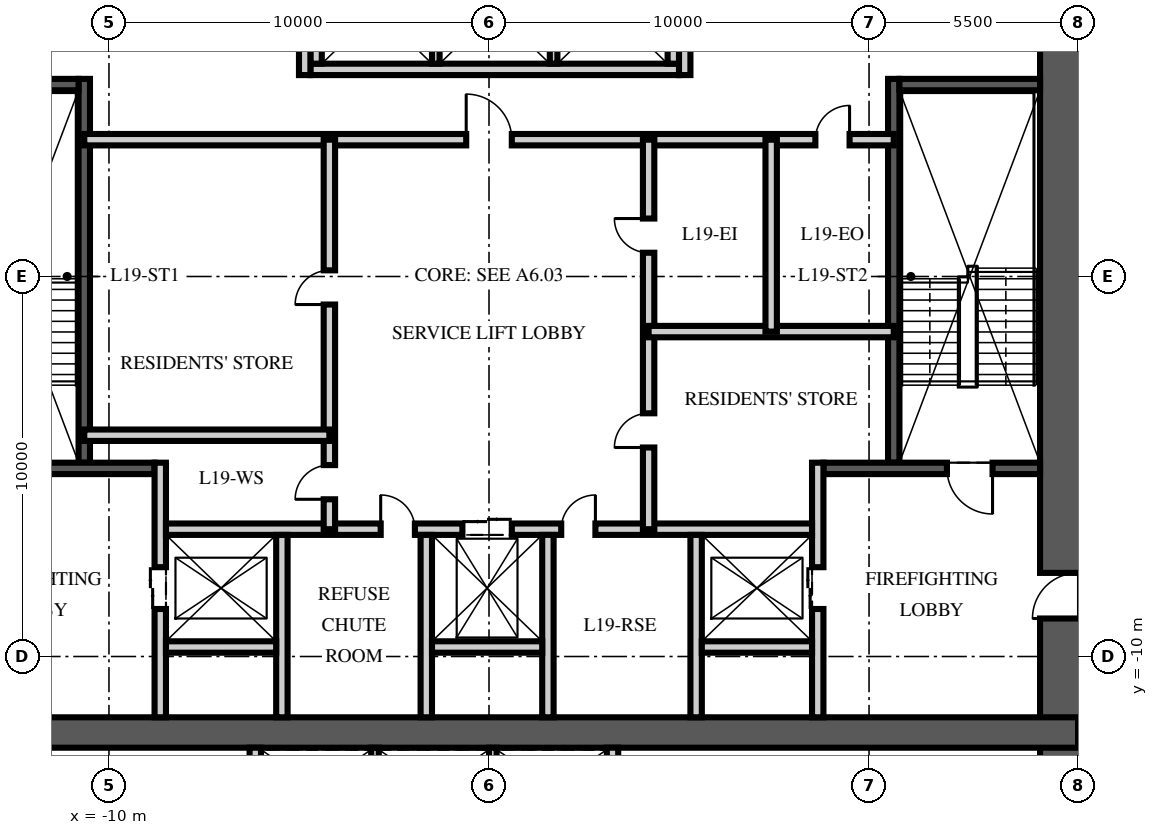
"""IFC4 building model, lengths in metres.
Left out: names, types, materials, properties, quantities, classifications, styles, units other than length and angle.
Written with IfcOpenShell. Run it as: python <this file> out.ifc"""

import sys

from ifc_helpers import new_model, si_unit, direction, frame, frame_2d, origin, place, context, subcontext, project, spatial, rectangle, extrude, element, fill, save


model = new_model("IFC4")
c1 = context("Model", 3, precision=1e-05, world=origin(), true_north=direction((0.0, 1.0)))
c2 = subcontext(c1, "Body", "Model", "MODEL_VIEW")
j1 = project(units=[si_unit("LENGTHUNIT", "METRE"), si_unit("PLANEANGLEUNIT", "RADIAN")], contexts=[c1])
p1 = place(None, origin())
s1 = spatial("IfcSite", under=j1, at=p1, CompositionType="ELEMENT")
p2 = place(p1, origin())
s2 = spatial("IfcBuilding", under=s1, at=p2, CompositionType="ELEMENT")
p3 = place(p2, frame((0.0, 0.0, 77.25)))
s3 = spatial("IfcBuildingStorey", under=s2, at=p3, CompositionType="ELEMENT", Elevation=77.25)
p4 = place(p3, frame((15.5, -15.5, -0.25), z_axis=(0.0, 0.0, 1.0), x_axis=(0.0, 1.0, 0.0)))
e1 = element("IfcWall", 1, at=p4, inside=s3, PredefinedType="SHEAR", context=c2, shape_type="SweptSolid", body=[
    extrude(rectangle(XDim=31.0, YDim=2.0, at=frame_2d((15.5, 0.0))), origin(), (0.0, 0.0, 1.0), 3.75),
])
p5 = place(p4, frame((6.5, 0.0, 0.25)))
e2 = element("IfcOpeningElement", 2, at=p5, cuts=e1, PredefinedType="OPENING", context=c2, shape_type="SweptSolid", body=[
    extrude(rectangle(XDim=1.2, YDim=2.1, at=frame_2d((0.6, 1.05))), frame((0.0, 1.01, 0.0), z_axis=(0.0, -1.0, 0.0), x_axis=(1.0, 0.0, 0.0)), (0.0, 0.0, 1.0), 2.02),
])
p6 = place(p4, frame((23.0, 0.0, 0.25)))
e3 = element("IfcOpeningElement", 3, at=p6, cuts=e1, PredefinedType="OPENING", context=c2, shape_type="SweptSolid", body=[
    extrude(rectangle(XDim=1.8, YDim=2.1, at=frame_2d((0.9, 1.05))), frame((0.0, 1.01, 0.0), z_axis=(0.0, -1.0, 0.0), x_axis=(1.0, 0.0, 0.0)), (0.0, 0.0, 1.0), 2.02),
])
p7 = place(p3, frame((-15.5, -12.0, -0.25), z_axis=(0.0, 0.0, 1.0), x_axis=(1.0, 0.0, 0.0)))
e4 = element("IfcWall", 4, at=p7, inside=s3, PredefinedType="SHEAR", context=c2, shape_type="SweptSolid", body=[
    extrude(rectangle(XDim=31.0, YDim=0.8, at=frame_2d((15.5, 0.0))), origin(), (0.0, 0.0, 1.0), 3.75),
])
p8 = place(p3, frame((-10.65, -4.9, 0.0), z_axis=(0.0, 0.0, 1.0), x_axis=(0.0, 1.0, 0.0)))
e5 = element("IfcWall", 5, at=p8, inside=s3, PredefinedType="SOLIDWALL", context=c2, shape_type="SweptSolid", body=[
    extrude(rectangle(XDim=10.1, YDim=0.3, at=frame_2d((5.05, 0.0))), origin(), (0.0, 0.0, 1.0), 3.5),
])
p9 = place(p3, frame((-14.5, -5.05, 0.0), z_axis=(0.0, 0.0, 1.0), x_axis=(1.0, 0.0, 0.0)))
e6 = element("IfcWall", 6, at=p9, inside=s3, PredefinedType="SOLIDWALL", context=c2, shape_type="SweptSolid", body=[
    extrude(rectangle(XDim=5.7, YDim=0.3, at=frame_2d((2.85, 0.0))), origin(), (0.0, 0.0, 1.0), 3.5),
])
p10 = place(p9, frame((1.25, 0.0, 0.0)))
e7 = element("IfcOpeningElement", 7, at=p10, cuts=e6, PredefinedType="OPENING", context=c2, shape_type="SweptSolid", body=[
    extrude(rectangle(XDim=1.2, YDim=2.1, at=frame_2d((0.6, 1.05))), frame((0.0, 0.16, 0.0), z_axis=(0.0, -1.0, 0.0), x_axis=(1.0, 0.0, 0.0)), (0.0, 0.0, 1.0), 0.32),
])
p11 = place(p3, frame((-14.5, 5.05, 0.0), z_axis=(0.0, 0.0, 1.0), x_axis=(1.0, 0.0, 0.0)))
e8 = element("IfcWall", 8, at=p11, inside=s3, PredefinedType="SOLIDWALL", context=c2, shape_type="SweptSolid", body=[
    extrude(rectangle(XDim=3.7, YDim=0.3, at=frame_2d((1.85, 0.0))), origin(), (0.0, 0.0, 1.0), 3.5),
])
p12 = place(p3, frame((-8.65, -11.6, 0.0), z_axis=(0.0, 0.0, 1.0), x_axis=(0.0, 1.0, 0.0)))
e9 = element("IfcWall", 9, at=p12, inside=s3, PredefinedType="PARTITIONING", context=c2, shape_type="SweptSolid", body=[
    extrude(rectangle(XDim=6.7, YDim=0.3, at=frame_2d((3.35, 0.0))), origin(), (0.0, 0.0, 1.0), 3.5),
])
p13 = place(p12, frame((2.85, 0.0, 0.0)))
e10 = element("IfcOpeningElement", 10, at=p13, cuts=e9, PredefinedType="OPENING", context=c2, shape_type="SweptSolid", body=[
    extrude(rectangle(XDim=1.1, YDim=2.1, at=frame_2d((0.55, 1.05))), frame((0.0, 0.16, 0.0), z_axis=(0.0, -1.0, 0.0), x_axis=(1.0, 0.0, 0.0)), (0.0, 0.0, 1.0), 0.32),
])
p14 = place(p3, frame((10.65, -4.9, 0.0), z_axis=(0.0, 0.0, 1.0), x_axis=(0.0, 1.0, 0.0)))
e11 = element("IfcWall", 11, at=p14, inside=s3, PredefinedType="SOLIDWALL", context=c2, shape_type="SweptSolid", body=[
    extrude(rectangle(XDim=10.1, YDim=0.3, at=frame_2d((5.05, 0.0))), origin(), (0.0, 0.0, 1.0), 3.5),
])
p15 = place(p3, frame((14.5, -5.05, 0.0), z_axis=(0.0, 0.0, 1.0), x_axis=(-1.0, 0.0, 0.0)))
e12 = element("IfcWall", 12, at=p15, inside=s3, PredefinedType="SOLIDWALL", context=c2, shape_type="SweptSolid", body=[
    extrude(rectangle(XDim=5.7, YDim=0.3, at=frame_2d((2.85, 0.0))), origin(), (0.0, 0.0, 1.0), 3.5),
])
p16 = place(p15, frame((1.25, 0.0, 0.0)))
e13 = element("IfcOpeningElement", 13, at=p16, cuts=e12, PredefinedType="OPENING", context=c2, shape_type="SweptSolid", body=[
    extrude(rectangle(XDim=1.2, YDim=2.1, at=frame_2d((0.6, 1.05))), frame((0.0, 0.16, 0.0), z_axis=(0.0, -1.0, 0.0), x_axis=(1.0, 0.0, 0.0)), (0.0, 0.0, 1.0), 0.32),
])
p17 = place(p3, frame((14.5, 5.05, 0.0), z_axis=(0.0, 0.0, 1.0), x_axis=(-1.0, 0.0, 0.0)))
e14 = element("IfcWall", 14, at=p17, inside=s3, PredefinedType="SOLIDWALL", context=c2, shape_type="SweptSolid", body=[
    extrude(rectangle(XDim=3.7, YDim=0.3, at=frame_2d((1.85, 0.0))), origin(), (0.0, 0.0, 1.0), 3.5),
])
p18 = place(p3, frame((8.65, -11.6, 0.0), z_axis=(0.0, 0.0, 1.0), x_axis=(0.0, 1.0, 0.0)))
e15 = element("IfcWall", 15, at=p18, inside=s3, PredefinedType="PARTITIONING", context=c2, shape_type="SweptSolid", body=[
    extrude(rectangle(XDim=6.7, YDim=0.3, at=frame_2d((3.35, 0.0))), origin(), (0.0, 0.0, 1.0), 3.5),
])
p19 = place(p18, frame((2.85, 0.0, 0.0)))
e16 = element("IfcOpeningElement", 16, at=p19, cuts=e15, PredefinedType="OPENING", context=c2, shape_type="SweptSolid", body=[
    extrude(rectangle(XDim=1.1, YDim=2.1, at=frame_2d((0.55, 1.05))), frame((0.0, 0.16, 0.0), z_axis=(0.0, -1.0, 0.0), x_axis=(1.0, 0.0, 0.0)), (0.0, 0.0, 1.0), 0.32),
])
p20 = place(p3, frame((-8.5, -6.65, 0.0), z_axis=(0.0, 0.0, 1.0), x_axis=(1.0, 0.0, 0.0)))
e17 = element("IfcWall", 17, at=p20, inside=s3, PredefinedType="PARTITIONING", context=c2, shape_type="SweptSolid", body=[
    extrude(rectangle(XDim=17.0, YDim=0.3, at=frame_2d((8.5, 0.0))), origin(), (0.0, 0.0, 1.0), 3.5),
])
p21 = place(p20, frame((7.8, 0.0, 0.0)))
e18 = element("IfcOpeningElement", 18, at=p21, cuts=e17, PredefinedType="OPENING", context=c2, shape_type="SweptSolid", body=[
    extrude(rectangle(XDim=1.3, YDim=2.4, at=frame_2d((0.65, 1.2))), frame((0.0, 0.16, 0.0), z_axis=(0.0, -1.0, 0.0), x_axis=(1.0, 0.0, 0.0)), (0.0, 0.0, 1.0), 0.32),
])
p22 = place(p20, frame((5.65, 0.0, 0.0)))
e19 = element("IfcOpeningElement", 19, at=p22, cuts=e17, PredefinedType="OPENING", context=c2, shape_type="SweptSolid", body=[
    extrude(rectangle(XDim=0.9, YDim=2.1, at=frame_2d((0.45, 1.05))), frame((0.0, 0.16, 0.0), z_axis=(0.0, -1.0, 0.0), x_axis=(1.0, 0.0, 0.0)), (0.0, 0.0, 1.0), 0.32),
])
p23 = place(p20, frame((10.4, 0.0, 0.0)))
e20 = element("IfcOpeningElement", 20, at=p23, cuts=e17, PredefinedType="OPENING", context=c2, shape_type="SweptSolid", body=[
    extrude(rectangle(XDim=0.9, YDim=2.1, at=frame_2d((0.45, 1.05))), frame((0.0, 0.16, 0.0), z_axis=(0.0, -1.0, 0.0), x_axis=(1.0, 0.0, 0.0)), (0.0, 0.0, 1.0), 0.32),
])
for number, where, z_axis, x_axis in (
    (21, (-5.45, -11.6, 0.0), (0.0, 0.0, 1.0), (0.0, 1.0, 0.0)),
    (22, (-1.65, -11.6, 0.0), (0.0, 0.0, 1.0), (0.0, 1.0, 0.0)),
    (23, (1.55, -11.6, 0.0), (0.0, 0.0, 1.0), (0.0, 1.0, 0.0)),
    (24, (5.45, -11.6, 0.0), (0.0, 0.0, 1.0), (0.0, 1.0, 0.0)),
):
    element("IfcWall", number, at=place(p3, frame(where, z_axis=z_axis, x_axis=x_axis)), inside=s3, PredefinedType="PARTITIONING", context=c2, shape_type="SweptSolid", body=[
        extrude(rectangle(XDim=4.8, YDim=0.3, at=frame_2d((2.4, 0.0))), origin(), (0.0, 0.0, 1.0), 3.5),
    ])
for number, where, z_axis, x_axis in (
    (25, (-8.5, -9.75, 0.0), (0.0, 0.0, 1.0), (1.0, 0.0, 0.0)),
    (26, (-1.5, -9.75, 0.0), (0.0, 0.0, 1.0), (1.0, 0.0, 0.0)),
    (27, (5.6, -9.75, 0.0), (0.0, 0.0, 1.0), (1.0, 0.0, 0.0)),
):
    element("IfcWall", number, at=place(p3, frame(where, z_axis=z_axis, x_axis=x_axis)), inside=s3, PredefinedType="PARTITIONING", context=c2, shape_type="SweptSolid", body=[
        extrude(rectangle(XDim=2.9, YDim=0.3, at=frame_2d((1.45, 0.0))), origin(), (0.0, 0.0, 1.0), 3.5),
    ])
p24 = place(p3, frame((-4.7, 5.45, 0.0), z_axis=(0.0, 0.0, 1.0), x_axis=(1.0, 0.0, 0.0)))
e28 = element("IfcWall", 28, at=p24, inside=s3, PredefinedType="PARTITIONING", context=c2, shape_type="SweptSolid", body=[
    extrude(rectangle(XDim=9.7, YDim=0.3, at=frame_2d((4.85, 0.0))), origin(), (0.0, 0.0, 1.0), 3.5),
])
for number, where, z_axis, x_axis in (
    (29, (-4.55, 5.6, 0.0), (0.0, 0.0, 1.0), (0.0, 1.0, 0.0)),
    (30, (4.85, 5.6, 0.0), (0.0, 0.0, 1.0), (0.0, 1.0, 0.0)),
):
    element("IfcWall", number, at=place(p3, frame(where, z_axis=z_axis, x_axis=x_axis)), inside=s3, PredefinedType="PARTITIONING", context=c2, shape_type="SweptSolid", body=[
        extrude(rectangle(XDim=2.8, YDim=0.3, at=frame_2d((1.4, 0.0))), origin(), (0.0, 0.0, 1.0), 3.5),
    ])
for number, where, z_axis, x_axis in (
    (31, (-1.4, 5.6, 0.0), (0.0, 0.0, 1.0), (0.0, 1.0, 0.0)),
    (32, (1.7, 5.6, 0.0), (0.0, 0.0, 1.0), (0.0, 1.0, 0.0)),
):
    element("IfcWall", number, at=place(p3, frame(where, z_axis=z_axis, x_axis=x_axis)), inside=s3, PredefinedType="PARTITIONING", context=c2, shape_type="SweptSolid", body=[
        extrude(rectangle(XDim=2.8, YDim=0.2, at=frame_2d((1.4, 0.0))), origin(), (0.0, 0.0, 1.0), 3.5),
    ])
for number, where, z_axis, x_axis in (
    (33, (-6.15, -14.5, 0.0), (0.0, 0.0, 1.0), (0.0, 1.0, 0.0)),
    (34, (3.25, -14.5, 0.0), (0.0, 0.0, 1.0), (0.0, 1.0, 0.0)),
):
    element("IfcWall", number, at=place(p3, frame(where, z_axis=z_axis, x_axis=x_axis)), inside=s3, PredefinedType="PARTITIONING", context=c2, shape_type="SweptSolid", body=[
        extrude(rectangle(XDim=2.1, YDim=0.3, at=frame_2d((1.05, 0.0))), origin(), (0.0, 0.0, 1.0), 3.5),
    ])
for number, where, z_axis, x_axis in (
    (35, (-3.0, -14.5, 0.0), (0.0, 0.0, 1.0), (0.0, 1.0, 0.0)),
    (36, (0.1, -14.5, 0.0), (0.0, 0.0, 1.0), (0.0, 1.0, 0.0)),
):
    element("IfcWall", number, at=place(p3, frame(where, z_axis=z_axis, x_axis=x_axis)), inside=s3, PredefinedType="PARTITIONING", context=c2, shape_type="SweptSolid", body=[
        extrude(rectangle(XDim=2.1, YDim=0.2, at=frame_2d((1.05, 0.0))), origin(), (0.0, 0.0, 1.0), 3.5),
    ])
p25 = place(p3, frame((-10.65, 3.6, 0.0), z_axis=(0.0, 0.0, 1.0), x_axis=(1.0, 0.0, 0.0)))
e37 = element("IfcWall", 37, at=p25, inside=s3, PredefinedType="PARTITIONING", context=c2, shape_type="SweptSolid", body=[
    extrude(rectangle(XDim=21.3, YDim=0.3, at=frame_2d((10.65, 0.0))), origin(), (0.0, 0.0, 1.0), 3.5),
])
p26 = place(p25, frame((10.05, 0.0, 0.0)))
e38 = element("IfcOpeningElement", 38, at=p26, cuts=e37, PredefinedType="OPENING", context=c2, shape_type="SweptSolid", body=[
    extrude(rectangle(XDim=1.2, YDim=2.1, at=frame_2d((0.6, 1.05))), frame((0.0, 0.16, 0.0), z_axis=(0.0, -1.0, 0.0), x_axis=(1.0, 0.0, 0.0)), (0.0, 0.0, 1.0), 0.32),
])
p27 = place(p25, frame((19.238, 0.0, 0.0)))
e39 = element("IfcOpeningElement", 39, at=p27, cuts=e37, PredefinedType="OPENING", context=c2, shape_type="SweptSolid", body=[
    extrude(rectangle(XDim=0.9, YDim=2.1, at=frame_2d((0.45, 1.05))), frame((0.0, 0.16, 0.0), z_axis=(0.0, -1.0, 0.0), x_axis=(1.0, 0.0, 0.0)), (0.0, 0.0, 1.0), 0.32),
])
p28 = place(p3, frame((-4.2, -6.65, 0.0), z_axis=(0.0, 0.0, 1.0), x_axis=(0.0, 1.0, 0.0)))
e40 = element("IfcWall", 40, at=p28, inside=s3, PredefinedType="PARTITIONING", context=c2, shape_type="SweptSolid", body=[
    extrude(rectangle(XDim=10.25, YDim=0.3, at=frame_2d((5.125, 0.0))), origin(), (0.0, 0.0, 1.0), 3.5),
])
p29 = place(p28, frame((0.787, 0.0, 0.0)))
e41 = element("IfcOpeningElement", 41, at=p29, cuts=e40, PredefinedType="OPENING", context=c2, shape_type="SweptSolid", body=[
    extrude(rectangle(XDim=0.9, YDim=2.1, at=frame_2d((0.45, 1.05))), frame((0.0, 0.16, 0.0), z_axis=(0.0, -1.0, 0.0), x_axis=(1.0, 0.0, 0.0)), (0.0, 0.0, 1.0), 0.32),
])
p30 = place(p28, frame((5.912, 0.0, 0.0)))
e42 = element("IfcOpeningElement", 42, at=p30, cuts=e40, PredefinedType="OPENING", context=c2, shape_type="SweptSolid", body=[
    extrude(rectangle(XDim=0.9, YDim=2.1, at=frame_2d((0.45, 1.05))), frame((0.0, 0.16, 0.0), z_axis=(0.0, -1.0, 0.0), x_axis=(1.0, 0.0, 0.0)), (0.0, 0.0, 1.0), 0.32),
])
p31 = place(p3, frame((4.2, -6.65, 0.0), z_axis=(0.0, 0.0, 1.0), x_axis=(0.0, 1.0, 0.0)))
e43 = element("IfcWall", 43, at=p31, inside=s3, PredefinedType="PARTITIONING", context=c2, shape_type="SweptSolid", body=[
    extrude(rectangle(XDim=10.25, YDim=0.3, at=frame_2d((5.125, 0.0))), origin(), (0.0, 0.0, 1.0), 3.5),
])
p32 = place(p31, frame((2.15, 0.0, 0.0)))
e44 = element("IfcOpeningElement", 44, at=p32, cuts=e43, PredefinedType="OPENING", context=c2, shape_type="SweptSolid", body=[
    extrude(rectangle(XDim=0.9, YDim=2.1, at=frame_2d((0.45, 1.05))), frame((0.0, 0.16, 0.0), z_axis=(0.0, -1.0, 0.0), x_axis=(1.0, 0.0, 0.0)), (0.0, 0.0, 1.0), 0.32),
])
p33 = place(p31, frame((7.275, 0.0, 0.0)))
e45 = element("IfcOpeningElement", 45, at=p33, cuts=e43, PredefinedType="OPENING", context=c2, shape_type="SweptSolid", body=[
    extrude(rectangle(XDim=0.9, YDim=2.1, at=frame_2d((0.45, 1.05))), frame((0.0, 0.16, 0.0), z_axis=(0.0, -1.0, 0.0), x_axis=(1.0, 0.0, 0.0)), (0.0, 0.0, 1.0), 0.32),
])
for number, where, z_axis, x_axis in (
    (46, (-10.65, -4.177, 0.0), (0.0, 0.0, 1.0), (1.0, 0.0, 0.0)),
    (47, (10.65, -1.45, 0.0), (0.0, 0.0, 1.0), (-1.0, 0.0, 0.0)),
):
    element("IfcWall", number, at=place(p3, frame(where, z_axis=z_axis, x_axis=x_axis)), inside=s3, PredefinedType="PARTITIONING", context=c2, shape_type="SweptSolid", body=[
        extrude(rectangle(XDim=6.45, YDim=0.3, at=frame_2d((3.225, 0.0))), origin(), (0.0, 0.0, 1.0), 3.5),
    ])
p34 = place(p3, frame((7.425, -1.45, 0.0), z_axis=(0.0, 0.0, 1.0), x_axis=(0.0, 1.0, 0.0)))
e48 = element("IfcWall", 48, at=p34, inside=s3, PredefinedType="PARTITIONING", context=c2, shape_type="SweptSolid", body=[
    extrude(rectangle(XDim=5.05, YDim=0.3, at=frame_2d((2.525, 0.0))), origin(), (0.0, 0.0, 1.0), 3.5),
])
p35 = place(p3, frame((-4.85, 5.3, 0.0), z_axis=(0.0, 0.0, 1.0), x_axis=(0.0, 1.0, 0.0)))
e49 = element("IfcWall", 49, at=p35, inside=s3, PredefinedType="PARTITIONING", context=c2, shape_type="SweptSolid", body=[
    extrude(rectangle(XDim=6.3, YDim=0.3, at=frame_2d((3.15, 0.0))), origin(), (0.0, 0.0, 1.0), 3.5),
])
p36 = place(p35, frame((4.35, 0.0, 0.0)))
e50 = element("IfcOpeningElement", 50, at=p36, cuts=e49, PredefinedType="OPENING", context=c2, shape_type="SweptSolid", body=[
    extrude(rectangle(XDim=0.9, YDim=2.1, at=frame_2d((0.45, 1.05))), frame((0.0, 0.16, 0.0), z_axis=(0.0, -1.0, 0.0), x_axis=(1.0, 0.0, 0.0)), (0.0, 0.0, 1.0), 0.32),
])
p37 = place(p3, frame((5.15, 5.3, 0.0), z_axis=(0.0, 0.0, 1.0), x_axis=(0.0, 1.0, 0.0)))
e51 = element("IfcWall", 51, at=p37, inside=s3, PredefinedType="PARTITIONING", context=c2, shape_type="SweptSolid", body=[
    extrude(rectangle(XDim=6.3, YDim=0.3, at=frame_2d((3.15, 0.0))), origin(), (0.0, 0.0, 1.0), 3.5),
])
p38 = place(p37, frame((4.35, 0.0, 0.0)))
e52 = element("IfcOpeningElement", 52, at=p38, cuts=e51, PredefinedType="OPENING", context=c2, shape_type="SweptSolid", body=[
    extrude(rectangle(XDim=0.9, YDim=2.1, at=frame_2d((0.45, 1.05))), frame((0.0, 0.16, 0.0), z_axis=(0.0, -1.0, 0.0), x_axis=(1.0, 0.0, 0.0)), (0.0, 0.0, 1.0), 0.32),
])
p39 = place(p16, origin())
e53 = element("IfcDoor", 53, at=p39, inside=s3, OperationType="SINGLE_SWING_LEFT", PredefinedType="DOOR", context=c2, shape_type="SweptSolid", body=[
    extrude(rectangle(XDim=1.2, YDim=2.1, at=frame_2d((0.6, 1.05))), frame((0.0, 0.025, 0.0), z_axis=(0.0, -1.0, 0.0), x_axis=(1.0, 0.0, 0.0)), (0.0, 0.0, 1.0), 0.05),
])
fill(e13, e53)
p40 = place(p5, origin())
e54 = element("IfcDoor", 54, at=p40, inside=s3, OperationType="SINGLE_SWING_LEFT", PredefinedType="DOOR", context=c2, shape_type="SweptSolid", body=[
    extrude(rectangle(XDim=1.2, YDim=2.1, at=frame_2d((0.6, 1.05))), frame((0.0, 0.025, 0.0), z_axis=(0.0, -1.0, 0.0), x_axis=(1.0, 0.0, 0.0)), (0.0, 0.0, 1.0), 0.05),
])
fill(e2, e54)
p41 = place(p13, origin())
e55 = element("IfcDoor", 55, at=p41, inside=s3, OperationType="DOUBLE_DOOR_SLIDING", PredefinedType="DOOR", context=c2, shape_type="SweptSolid", body=[
    extrude(rectangle(XDim=1.1, YDim=2.1, at=frame_2d((0.55, 1.05))), frame((0.0, 0.025, 0.0), z_axis=(0.0, -1.0, 0.0), x_axis=(1.0, 0.0, 0.0)), (0.0, 0.0, 1.0), 0.05),
])
fill(e10, e55)
p42 = place(p19, origin())
e56 = element("IfcDoor", 56, at=p42, inside=s3, OperationType="DOUBLE_DOOR_SLIDING", PredefinedType="DOOR", context=c2, shape_type="SweptSolid", body=[
    extrude(rectangle(XDim=1.1, YDim=2.1, at=frame_2d((0.55, 1.05))), frame((0.0, 0.025, 0.0), z_axis=(0.0, -1.0, 0.0), x_axis=(1.0, 0.0, 0.0)), (0.0, 0.0, 1.0), 0.05),
])
fill(e16, e56)
p43 = place(p21, origin())
e57 = element("IfcDoor", 57, at=p43, inside=s3, OperationType="DOUBLE_DOOR_SLIDING", PredefinedType="DOOR", context=c2, shape_type="SweptSolid", body=[
    extrude(rectangle(XDim=1.3, YDim=2.4, at=frame_2d((0.65, 1.2))), frame((0.0, 0.025, 0.0), z_axis=(0.0, -1.0, 0.0), x_axis=(1.0, 0.0, 0.0)), (0.0, 0.0, 1.0), 0.05),
])
fill(e18, e57)
p44 = place(p26, origin())
e58 = element("IfcDoor", 58, at=p44, inside=s3, OperationType="SINGLE_SWING_LEFT", PredefinedType="DOOR", context=c2, shape_type="SweptSolid", body=[
    extrude(rectangle(XDim=1.2, YDim=2.1, at=frame_2d((0.6, 1.05))), frame((0.0, 0.025, 0.0), z_axis=(0.0, -1.0, 0.0), x_axis=(1.0, 0.0, 0.0)), (0.0, 0.0, 1.0), 0.05),
])
fill(e38, e58)
p45 = place(p22, origin())
e59 = element("IfcDoor", 59, at=p45, inside=s3, OperationType="SINGLE_SWING_LEFT", PredefinedType="DOOR", context=c2, shape_type="SweptSolid", body=[
    extrude(rectangle(XDim=0.9, YDim=2.1, at=frame_2d((0.45, 1.05))), frame((0.0, 0.025, 0.0), z_axis=(0.0, -1.0, 0.0), x_axis=(1.0, 0.0, 0.0)), (0.0, 0.0, 1.0), 0.05),
])
fill(e19, e59)
p46 = place(p23, origin())
e60 = element("IfcDoor", 60, at=p46, inside=s3, OperationType="SINGLE_SWING_RIGHT", PredefinedType="DOOR", context=c2, shape_type="SweptSolid", body=[
    extrude(rectangle(XDim=0.9, YDim=2.1, at=frame_2d((0.45, 1.05))), frame((0.0, 0.025, 0.0), z_axis=(0.0, -1.0, 0.0), x_axis=(1.0, 0.0, 0.0)), (0.0, 0.0, 1.0), 0.05),
])
fill(e20, e60)
p47 = place(p29, origin())
e61 = element("IfcDoor", 61, at=p47, inside=s3, OperationType="SINGLE_SWING_LEFT", PredefinedType="DOOR", context=c2, shape_type="SweptSolid", body=[
    extrude(rectangle(XDim=0.9, YDim=2.1, at=frame_2d((0.45, 1.05))), frame((0.0, 0.025, 0.0), z_axis=(0.0, -1.0, 0.0), x_axis=(1.0, 0.0, 0.0)), (0.0, 0.0, 1.0), 0.05),
])
fill(e41, e61)
p48 = place(p30, origin())
e62 = element("IfcDoor", 62, at=p48, inside=s3, OperationType="SINGLE_SWING_LEFT", PredefinedType="DOOR", context=c2, shape_type="SweptSolid", body=[
    extrude(rectangle(XDim=0.9, YDim=2.1, at=frame_2d((0.45, 1.05))), frame((0.0, 0.025, 0.0), z_axis=(0.0, -1.0, 0.0), x_axis=(1.0, 0.0, 0.0)), (0.0, 0.0, 1.0), 0.05),
])
fill(e42, e62)
p49 = place(p32, origin())
e63 = element("IfcDoor", 63, at=p49, inside=s3, OperationType="SINGLE_SWING_LEFT", PredefinedType="DOOR", context=c2, shape_type="SweptSolid", body=[
    extrude(rectangle(XDim=0.9, YDim=2.1, at=frame_2d((0.45, 1.05))), frame((0.0, 0.025, 0.0), z_axis=(0.0, -1.0, 0.0), x_axis=(1.0, 0.0, 0.0)), (0.0, 0.0, 1.0), 0.05),
])
fill(e44, e63)
p50 = place(p33, origin())
e64 = element("IfcDoor", 64, at=p50, inside=s3, OperationType="SINGLE_SWING_RIGHT", PredefinedType="DOOR", context=c2, shape_type="SweptSolid", body=[
    extrude(rectangle(XDim=0.9, YDim=2.1, at=frame_2d((0.45, 1.05))), frame((0.0, 0.025, 0.0), z_axis=(0.0, -1.0, 0.0), x_axis=(1.0, 0.0, 0.0)), (0.0, 0.0, 1.0), 0.05),
])
fill(e45, e64)
p51 = place(p27, origin())
e65 = element("IfcDoor", 65, at=p51, inside=s3, OperationType="SINGLE_SWING_RIGHT", PredefinedType="DOOR", context=c2, shape_type="SweptSolid", body=[
    extrude(rectangle(XDim=0.9, YDim=2.1, at=frame_2d((0.45, 1.05))), frame((0.0, 0.025, 0.0), z_axis=(0.0, -1.0, 0.0), x_axis=(1.0, 0.0, 0.0)), (0.0, 0.0, 1.0), 0.05),
])
fill(e39, e65)
save(model, sys.argv[1])
